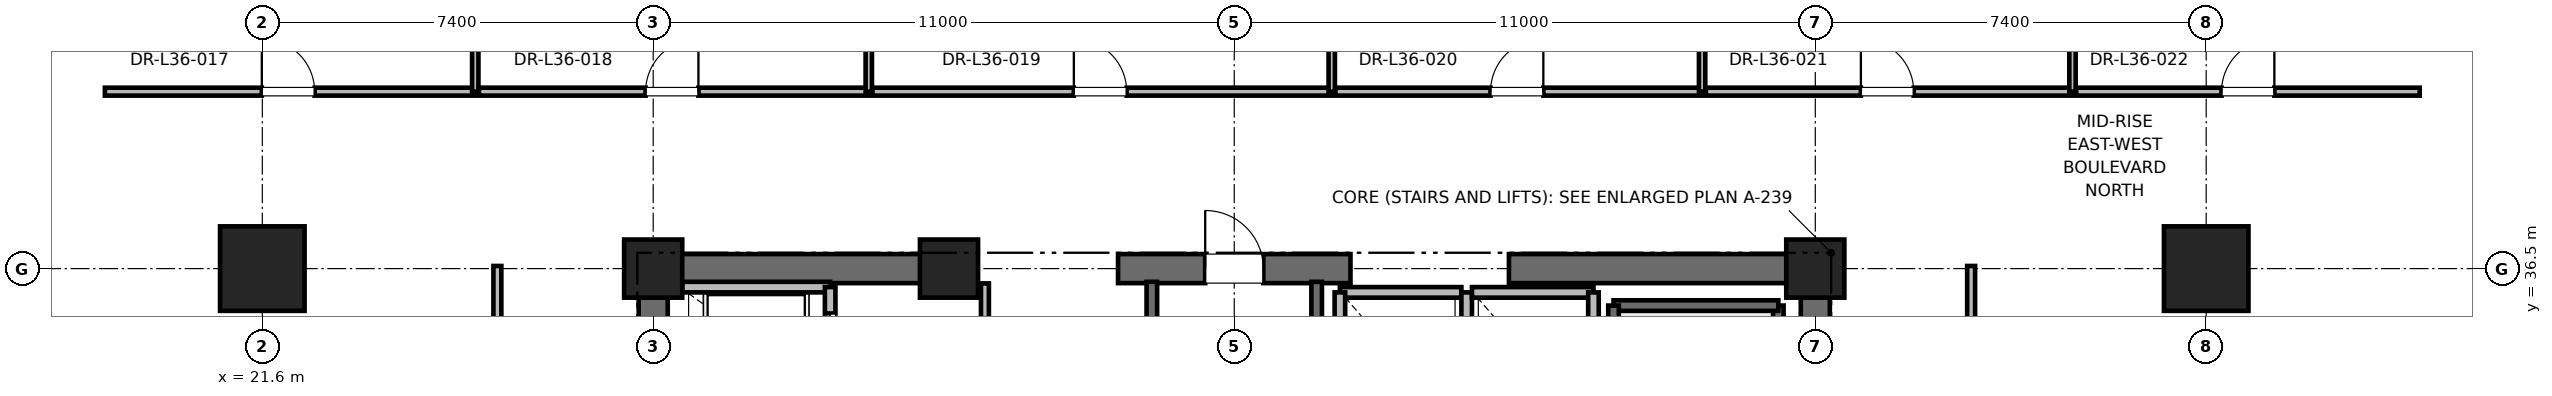
"""IFC4 building model, lengths in metres.
Left out: names, types, materials, properties, quantities, classifications, styles, units other than length and angle.
Written with IfcOpenShell. Run it as: python <this file> out.ifc"""

import sys

from ifc_helpers import new_model, si_unit, direction, frame, frame_2d, origin, origin_2d, place, context, subcontext, project, spatial, rectangle, extrude, element, fill, save


model = new_model("IFC4")
c1 = context("Model", 3, precision=1e-05, world=origin(), true_north=direction((0.0, 1.0)))
c2 = subcontext(c1, "Body", "Model", "MODEL_VIEW")
j1 = project(units=[si_unit("LENGTHUNIT", "METRE"), si_unit("PLANEANGLEUNIT", "RADIAN")], contexts=[c1])
p1 = place(None, origin())
s1 = spatial("IfcSite", under=j1, at=p1, CompositionType="ELEMENT")
p2 = place(p1, origin())
s2 = spatial("IfcBuilding", under=s1, at=p2, CompositionType="ELEMENT")
p3 = place(p2, frame((0.0, 0.0, 156.4)))
s3 = spatial("IfcBuildingStorey", under=s2, at=p3, CompositionType="ELEMENT", Elevation=156.4)
for number, where, z_axis, x_axis in (
    (1, (21.6, 36.5, 0.0), (0.0, 0.0, 1.0), (1.0, 0.0, 0.0)),
    (2, (58.4, 36.5, 0.0), (0.0, 0.0, 1.0), (1.0, 0.0, 0.0)),
):
    element("IfcColumn", number, at=place(p3, frame(where, z_axis=z_axis, x_axis=x_axis)), inside=s3, PredefinedType="COLUMN", context=c2, shape_type="SweptSolid", body=[
        extrude(rectangle(XDim=1.6, YDim=1.6, at=origin_2d()), origin(), (0.0, 0.0, 1.0), 4.0),
    ])
for number, where, z_axis, x_axis in (
    (3, (29.0, 36.5, 0.0), (0.0, 0.0, 1.0), (1.0, 0.0, 0.0)),
    (4, (51.0, 36.5, 0.0), (0.0, 0.0, 1.0), (1.0, 0.0, 0.0)),
    (5, (34.6, 36.5, 0.0), (0.0, 0.0, 1.0), (1.0, 0.0, 0.0)),
):
    element("IfcColumn", number, at=place(p3, frame(where, z_axis=z_axis, x_axis=x_axis)), inside=s3, PredefinedType="PILASTER", context=c2, shape_type="SweptSolid", body=[
        extrude(rectangle(XDim=1.1, YDim=1.1, at=origin_2d()), origin(), (0.0, 0.0, 1.0), 4.0),
    ])
p4 = place(p3, frame((29.0, 36.5, 0.0), z_axis=(0.0, 0.0, 1.0), x_axis=(1.0, 0.0, 0.0)))
e6 = element("IfcWall", 6, at=p4, inside=s3, PredefinedType="SHEAR", context=c2, shape_type="SweptSolid", body=[
    extrude(rectangle(XDim=5.8, YDim=0.55, at=frame_2d((2.9, 0.0))), origin(), (0.0, 0.0, 1.0), 3.775),
])
p5 = place(p3, frame((37.8, 36.5, 0.0), z_axis=(0.0, 0.0, 1.0), x_axis=(1.0, 0.0, 0.0)))
e7 = element("IfcWall", 7, at=p5, inside=s3, PredefinedType="SHEAR", context=c2, shape_type="SweptSolid", body=[
    extrude(rectangle(XDim=4.4, YDim=0.55, at=frame_2d((2.2, 0.0))), origin(), (0.0, 0.0, 1.0), 3.775),
])
p6 = place(p5, frame((1.65, 0.0, 0.0)))
e8 = element("IfcOpeningElement", 8, at=p6, cuts=e7, PredefinedType="OPENING", context=c2, shape_type="SweptSolid", body=[
    extrude(rectangle(XDim=1.1, YDim=2.15, at=frame_2d((0.55, 1.075))), frame((0.0, 0.275, 0.0), z_axis=(0.0, -1.0, 0.0), x_axis=(1.0, 0.0, 0.0)), (0.0, 0.0, 1.0), 0.55),
])
for number, where, z_axis, x_axis in (
    (9, (45.2, 36.5, 0.0), (0.0, 0.0, 1.0), (1.0, 0.0, 0.0)),
    (10, (29.0, 30.7, 0.0), (0.0, 0.0, 1.0), (0.0, 1.0, 0.0)),
):
    element("IfcWall", number, at=place(p3, frame(where, z_axis=z_axis, x_axis=x_axis)), inside=s3, PredefinedType="SHEAR", context=c2, shape_type="SweptSolid", body=[
        extrude(rectangle(XDim=5.8, YDim=0.55, at=frame_2d((2.9, 0.0))), origin(), (0.0, 0.0, 1.0), 3.775),
    ])
p7 = place(p3, frame((51.0, 27.7, 0.0), z_axis=(0.0, 0.0, 1.0), x_axis=(0.0, 1.0, 0.0)))
e11 = element("IfcWall", 11, at=p7, inside=s3, PredefinedType="SHEAR", context=c2, shape_type="SweptSolid", body=[
    extrude(rectangle(XDim=8.8, YDim=0.55, at=frame_2d((4.4, 0.0))), origin(), (0.0, 0.0, 1.0), 3.775),
])
p8 = place(p3, frame((50.3, 27.65, 0.0), z_axis=(0.0, 0.0, 1.0), x_axis=(0.0, 1.0, 0.0)))
e12 = element("IfcWall", 12, at=p8, inside=s3, PredefinedType="SOLIDWALL", context=c2, shape_type="SweptSolid", body=[
    extrude(rectangle(XDim=8.15, YDim=0.2, at=frame_2d((4.075, 0.0))), origin(), (0.0, 0.0, 1.0), 3.775),
])
p9 = place(p3, frame((47.18, 35.8, 0.0), z_axis=(0.0, 0.0, 1.0), x_axis=(1.0, 0.0, 0.0)))
e13 = element("IfcWall", 13, at=p9, inside=s3, PredefinedType="SOLIDWALL", context=c2, shape_type="SweptSolid", body=[
    extrude(rectangle(XDim=3.12, YDim=0.2, at=frame_2d((1.56, 0.0))), origin(), (0.0, 0.0, 1.0), 3.775),
])
p10 = place(p3, frame((47.18, 27.62, 0.0), z_axis=(0.0, 0.0, 1.0), x_axis=(0.0, 1.0, 0.0)))
e14 = element("IfcWall", 14, at=p10, inside=s3, PredefinedType="SOLIDWALL", context=c2, shape_type="SweptSolid", body=[
    extrude(rectangle(XDim=8.18, YDim=0.2, at=frame_2d((4.09, 0.0))), origin(), (0.0, 0.0, 1.0), 3.775),
])
p11 = place(p3, frame((38.44, 27.38, 0.0), z_axis=(0.0, 0.0, 1.0), x_axis=(0.0, 1.0, 0.0)))
e15 = element("IfcWall", 15, at=p11, inside=s3, PredefinedType="SOLIDWALL", context=c2, shape_type="SweptSolid", body=[
    extrude(rectangle(XDim=8.87, YDim=0.2, at=frame_2d((4.435, 0.0))), origin(), (0.0, 0.0, 1.0), 3.775),
])
p12 = place(p3, frame((41.56, 27.68, 0.0), z_axis=(0.0, 0.0, 1.0), x_axis=(0.0, 1.0, 0.0)))
e16 = element("IfcWall", 16, at=p12, inside=s3, PredefinedType="SOLIDWALL", context=c2, shape_type="SweptSolid", body=[
    extrude(rectangle(XDim=8.57, YDim=0.2, at=frame_2d((4.285, 0.0))), origin(), (0.0, 0.0, 1.0), 3.775),
])
p13 = place(p3, frame((32.35, 36.15, 0.0), z_axis=(0.0, 0.0, 1.0), x_axis=(-1.0, 0.0, 0.0)))
e17 = element("IfcWall", 17, at=p13, inside=s3, PredefinedType="SOLIDWALL", context=c2, shape_type="SweptSolid", body=[
    extrude(rectangle(XDim=2.8, YDim=0.2, at=frame_2d((1.4, 0.0))), origin(), (0.0, 0.0, 1.0), 2.985),
])
p14 = place(p3, frame((32.35, 34.05, 0.0), z_axis=(0.0, 0.0, 1.0), x_axis=(0.0, 1.0, 0.0)))
e18 = element("IfcWall", 18, at=p14, inside=s3, PredefinedType="SOLIDWALL", context=c2, shape_type="SweptSolid", body=[
    extrude(rectangle(XDim=2.1, YDim=0.2, at=frame_2d((1.05, 0.0))), origin(), (0.0, 0.0, 1.0), 3.775),
])
p15 = place(p14, frame((0.5, 0.0, 0.0)))
e19 = element("IfcOpeningElement", 19, at=p15, cuts=e18, PredefinedType="OPENING", context=c2, shape_type="SweptSolid", body=[
    extrude(rectangle(XDim=1.1, YDim=2.2, at=frame_2d((0.55, 1.1))), frame((0.0, 0.1, 0.0), z_axis=(0.0, -1.0, 0.0), x_axis=(1.0, 0.0, 0.0)), (0.0, 0.0, 1.0), 0.2),
])
p16 = place(p3, frame((44.3, 36.05, 0.0), z_axis=(0.0, 0.0, 1.0), x_axis=(-1.0, 0.0, 0.0)))
e20 = element("IfcWall", 20, at=p16, inside=s3, PredefinedType="SOLIDWALL", context=c2, shape_type="SweptSolid", body=[
    extrude(rectangle(XDim=2.3, YDim=0.2, at=frame_2d((1.15, 0.0))), origin(), (0.0, 0.0, 1.0), 2.755),
])
for number, where, z_axis, x_axis in (
    (21, (42.0, 36.05, 0.0), (0.0, 0.0, 1.0), (0.0, -1.0, 0.0)),
    (22, (44.4, 33.45, 0.0), (0.0, 0.0, 1.0), (0.0, 1.0, 0.0)),
):
    element("IfcWall", number, at=place(p3, frame(where, z_axis=z_axis, x_axis=x_axis)), inside=s3, PredefinedType="SOLIDWALL", context=c2, shape_type="SweptSolid", body=[
        extrude(rectangle(XDim=2.6, YDim=0.2, at=frame_2d((1.3, 0.0))), origin(), (0.0, 0.0, 1.0), 2.755),
    ])
p17 = place(p3, frame((46.8, 36.05, 0.0), z_axis=(0.0, 0.0, 1.0), x_axis=(-1.0, 0.0, 0.0)))
e23 = element("IfcWall", 23, at=p17, inside=s3, PredefinedType="SOLIDWALL", context=c2, shape_type="SweptSolid", body=[
    extrude(rectangle(XDim=2.3, YDim=0.2, at=frame_2d((1.15, 0.0))), origin(), (0.0, 0.0, 1.0), 2.755),
])
p18 = place(p3, frame((46.8, 33.45, 0.0), z_axis=(0.0, 0.0, 1.0), x_axis=(0.0, 1.0, 0.0)))
e24 = element("IfcWall", 24, at=p18, inside=s3, PredefinedType="SOLIDWALL", context=c2, shape_type="SweptSolid", body=[
    extrude(rectangle(XDim=2.6, YDim=0.2, at=frame_2d((1.3, 0.0))), origin(), (0.0, 0.0, 1.0), 3.775),
])
p19 = place(p3, frame((35.28, 33.95, 0.0), z_axis=(0.0, 0.0, 1.0), x_axis=(0.0, 1.0, 0.0)))
e25 = element("IfcWall", 25, at=p19, inside=s3, PredefinedType="PARTITIONING", context=c2, shape_type="SweptSolid", body=[
    extrude(rectangle(XDim=2.27, YDim=0.15, at=frame_2d((1.135, 0.0))), origin(), (0.0, 0.0, 1.0), 2.755),
])
p20 = place(p19, frame((0.66, 0.0, 0.0)))
e26 = element("IfcOpeningElement", 26, at=p20, cuts=e25, PredefinedType="OPENING", context=c2, shape_type="SweptSolid", body=[
    extrude(rectangle(XDim=0.95, YDim=2.15, at=frame_2d((0.475, 1.075))), frame((0.0, 0.075, 0.0), z_axis=(0.0, -1.0, 0.0), x_axis=(1.0, 0.0, 0.0)), (0.0, 0.0, 1.0), 0.15),
])
p21 = place(p3, frame((18.62, 39.85, 0.0), z_axis=(0.0, 0.0, 1.0), x_axis=(1.0, 0.0, 0.0)))
e27 = element("IfcWall", 27, at=p21, inside=s3, PredefinedType="PARTITIONING", context=c2, shape_type="SweptSolid", body=[
    extrude(rectangle(XDim=7.012, YDim=0.15, at=frame_2d((3.506, 0.0))), origin(), (0.0, 0.0, 1.0), 2.85),
])
p22 = place(p21, frame((2.971, 0.0, 0.0)))
e28 = element("IfcOpeningElement", 28, at=p22, cuts=e27, PredefinedType="OPENING", context=c2, shape_type="SweptSolid", body=[
    extrude(rectangle(XDim=1.0, YDim=2.15, at=frame_2d((0.5, 1.075))), frame((0.0, 0.075, 0.0), z_axis=(0.0, -1.0, 0.0), x_axis=(1.0, 0.0, 0.0)), (0.0, 0.0, 1.0), 0.15),
])
p23 = place(p3, frame((25.631, 39.85, 0.0), z_axis=(0.0, 0.0, 1.0), x_axis=(0.0, 1.0, 0.0)))
e29 = element("IfcWall", 29, at=p23, inside=s3, PredefinedType="PARTITIONING", context=c2, shape_type="SweptSolid", body=[
    extrude(rectangle(XDim=9.696, YDim=0.12, at=frame_2d((4.848, 0.0))), origin(), (0.0, 0.0, 1.0), 2.85),
])
p24 = place(p3, frame((25.701, 39.85, 0.0), z_axis=(0.0, 0.0, 1.0), x_axis=(1.0, 0.0, 0.0)))
e30 = element("IfcWall", 30, at=p24, inside=s3, PredefinedType="PARTITIONING", context=c2, shape_type="SweptSolid", body=[
    extrude(rectangle(XDim=7.38, YDim=0.15, at=frame_2d((3.69, 0.0))), origin(), (0.0, 0.0, 1.0), 2.85),
])
p25 = place(p24, frame((3.155, 0.0, 0.0)))
e31 = element("IfcOpeningElement", 31, at=p25, cuts=e30, PredefinedType="OPENING", context=c2, shape_type="SweptSolid", body=[
    extrude(rectangle(XDim=1.0, YDim=2.15, at=frame_2d((0.5, 1.075))), frame((0.0, 0.075, 0.0), z_axis=(0.0, -1.0, 0.0), x_axis=(1.0, 0.0, 0.0)), (0.0, 0.0, 1.0), 0.15),
])
p26 = place(p3, frame((33.081, 39.85, 0.0), z_axis=(0.0, 0.0, 1.0), x_axis=(0.0, 1.0, 0.0)))
e32 = element("IfcWall", 32, at=p26, inside=s3, PredefinedType="PARTITIONING", context=c2, shape_type="SweptSolid", body=[
    extrude(rectangle(XDim=9.696, YDim=0.12, at=frame_2d((4.848, 0.0))), origin(), (0.0, 0.0, 1.0), 2.405),
])
p27 = place(p3, frame((33.151, 39.85, 0.0), z_axis=(0.0, 0.0, 1.0), x_axis=(1.0, 0.0, 0.0)))
e33 = element("IfcWall", 33, at=p27, inside=s3, PredefinedType="PARTITIONING", context=c2, shape_type="SweptSolid", body=[
    extrude(rectangle(XDim=8.694, YDim=0.15, at=frame_2d((4.347, 0.0))), origin(), (0.0, 0.0, 1.0), 2.85),
])
p28 = place(p27, frame((3.812, 0.0, 0.0)))
e34 = element("IfcOpeningElement", 34, at=p28, cuts=e33, PredefinedType="OPENING", context=c2, shape_type="SweptSolid", body=[
    extrude(rectangle(XDim=1.0, YDim=2.15, at=frame_2d((0.5, 1.075))), frame((0.0, 0.075, 0.0), z_axis=(0.0, -1.0, 0.0), x_axis=(1.0, 0.0, 0.0)), (0.0, 0.0, 1.0), 0.15),
])
p29 = place(p3, frame((41.845, 39.85, 0.0), z_axis=(0.0, 0.0, 1.0), x_axis=(0.0, 1.0, 0.0)))
e35 = element("IfcWall", 35, at=p29, inside=s3, PredefinedType="PARTITIONING", context=c2, shape_type="SweptSolid", body=[
    extrude(rectangle(XDim=9.696, YDim=0.12, at=frame_2d((4.848, 0.0))), origin(), (0.0, 0.0, 1.0), 2.405),
])
p30 = place(p3, frame((41.916, 39.85, 0.0), z_axis=(0.0, 0.0, 1.0), x_axis=(1.0, 0.0, 0.0)))
e36 = element("IfcWall", 36, at=p30, inside=s3, PredefinedType="PARTITIONING", context=c2, shape_type="SweptSolid", body=[
    extrude(rectangle(XDim=6.942, YDim=0.15, at=frame_2d((3.471, 0.0))), origin(), (0.0, 0.0, 1.0), 2.85),
])
p31 = place(p30, frame((2.936, 0.0, 0.0)))
e37 = element("IfcOpeningElement", 37, at=p31, cuts=e36, PredefinedType="OPENING", context=c2, shape_type="SweptSolid", body=[
    extrude(rectangle(XDim=1.0, YDim=2.15, at=frame_2d((0.5, 1.075))), frame((0.0, 0.075, 0.0), z_axis=(0.0, -1.0, 0.0), x_axis=(1.0, 0.0, 0.0)), (0.0, 0.0, 1.0), 0.15),
])
p32 = place(p3, frame((48.857, 39.85, 0.0), z_axis=(0.0, 0.0, 1.0), x_axis=(0.0, 1.0, 0.0)))
e38 = element("IfcWall", 38, at=p32, inside=s3, PredefinedType="PARTITIONING", context=c2, shape_type="SweptSolid", body=[
    extrude(rectangle(XDim=9.696, YDim=0.12, at=frame_2d((4.848, 0.0))), origin(), (0.0, 0.0, 1.0), 2.405),
])
p33 = place(p3, frame((48.927, 39.85, 0.0), z_axis=(0.0, 0.0, 1.0), x_axis=(1.0, 0.0, 0.0)))
e39 = element("IfcWall", 39, at=p33, inside=s3, PredefinedType="PARTITIONING", context=c2, shape_type="SweptSolid", body=[
    extrude(rectangle(XDim=6.942, YDim=0.15, at=frame_2d((3.471, 0.0))), origin(), (0.0, 0.0, 1.0), 2.85),
])
p34 = place(p33, frame((2.936, 0.0, 0.0)))
e40 = element("IfcOpeningElement", 40, at=p34, cuts=e39, PredefinedType="OPENING", context=c2, shape_type="SweptSolid", body=[
    extrude(rectangle(XDim=1.0, YDim=2.15, at=frame_2d((0.5, 1.075))), frame((0.0, 0.075, 0.0), z_axis=(0.0, -1.0, 0.0), x_axis=(1.0, 0.0, 0.0)), (0.0, 0.0, 1.0), 0.15),
])
p35 = place(p3, frame((55.869, 39.85, 0.0), z_axis=(0.0, 0.0, 1.0), x_axis=(0.0, 1.0, 0.0)))
e41 = element("IfcWall", 41, at=p35, inside=s3, PredefinedType="PARTITIONING", context=c2, shape_type="SweptSolid", body=[
    extrude(rectangle(XDim=9.696, YDim=0.12, at=frame_2d((4.848, 0.0))), origin(), (0.0, 0.0, 1.0), 2.85),
])
p36 = place(p3, frame((55.939, 39.85, 0.0), z_axis=(0.0, 0.0, 1.0), x_axis=(1.0, 0.0, 0.0)))
e42 = element("IfcWall", 42, at=p36, inside=s3, PredefinedType="PARTITIONING", context=c2, shape_type="SweptSolid", body=[
    extrude(rectangle(XDim=6.503, YDim=0.15, at=frame_2d((3.251, 0.0))), origin(), (0.0, 0.0, 1.0), 2.85),
])
p37 = place(p36, frame((2.752, 0.0, 0.0)))
e43 = element("IfcOpeningElement", 43, at=p37, cuts=e42, PredefinedType="OPENING", context=c2, shape_type="SweptSolid", body=[
    extrude(rectangle(XDim=1.0, YDim=2.15, at=frame_2d((0.5, 1.075))), frame((0.0, 0.075, 0.0), z_axis=(0.0, -1.0, 0.0), x_axis=(1.0, 0.0, 0.0)), (0.0, 0.0, 1.0), 0.15),
])
p38 = place(p3, frame((26.05, 18.45, 0.0), z_axis=(0.0, 0.0, 1.0), x_axis=(0.0, 1.0, 0.0)))
e44 = element("IfcWall", 44, at=p38, inside=s3, PredefinedType="PARTITIONING", context=c2, shape_type="SweptSolid", body=[
    extrude(rectangle(XDim=18.1, YDim=0.15, at=frame_2d((9.05, 0.0))), origin(), (0.0, 0.0, 1.0), 2.85),
])
p39 = place(p38, frame((8.55, 0.0, 0.0)))
e45 = element("IfcOpeningElement", 45, at=p39, cuts=e44, PredefinedType="OPENING", context=c2, shape_type="SweptSolid", body=[
    extrude(rectangle(XDim=1.0, YDim=2.15, at=frame_2d((0.5, 1.075))), frame((0.0, 0.075, 0.0), z_axis=(0.0, -1.0, 0.0), x_axis=(1.0, 0.0, 0.0)), (0.0, 0.0, 1.0), 0.15),
])
p40 = place(p3, frame((53.95, 18.45, 0.0), z_axis=(0.0, 0.0, 1.0), x_axis=(0.0, 1.0, 0.0)))
e46 = element("IfcWall", 46, at=p40, inside=s3, PredefinedType="PARTITIONING", context=c2, shape_type="SweptSolid", body=[
    extrude(rectangle(XDim=18.1, YDim=0.15, at=frame_2d((9.05, 0.0))), origin(), (0.0, 0.0, 1.0), 2.85),
])
p41 = place(p40, frame((8.55, 0.0, 0.0)))
e47 = element("IfcOpeningElement", 47, at=p41, cuts=e46, PredefinedType="OPENING", context=c2, shape_type="SweptSolid", body=[
    extrude(rectangle(XDim=1.0, YDim=2.15, at=frame_2d((0.5, 1.075))), frame((0.0, 0.075, 0.0), z_axis=(0.0, -1.0, 0.0), x_axis=(1.0, 0.0, 0.0)), (0.0, 0.0, 1.0), 0.15),
])
p42 = place(p6, origin())
e48 = element("IfcDoor", 48, at=p42, inside=s3, OperationType="SINGLE_SWING_LEFT", PredefinedType="DOOR", context=c2, shape_type="SweptSolid", body=[
    extrude(rectangle(XDim=1.1, YDim=2.15, at=frame_2d((0.55, 1.075))), frame((0.0, 0.025, 0.0), z_axis=(0.0, -1.0, 0.0), x_axis=(1.0, 0.0, 0.0)), (0.0, 0.0, 1.0), 0.05),
])
fill(e8, e48)
p43 = place(p15, origin())
e49 = element("IfcDoor", 49, at=p43, inside=s3, OperationType="SLIDING_TO_RIGHT", PredefinedType="DOOR", context=c2, shape_type="SweptSolid", body=[
    extrude(rectangle(XDim=1.1, YDim=2.2, at=frame_2d((0.55, 1.1))), frame((0.0, 0.025, 0.0), z_axis=(0.0, -1.0, 0.0), x_axis=(1.0, 0.0, 0.0)), (0.0, 0.0, 1.0), 0.05),
])
fill(e19, e49)
p44 = place(p22, origin())
e50 = element("IfcDoor", 50, at=p44, inside=s3, OperationType="SINGLE_SWING_LEFT", PredefinedType="DOOR", context=c2, shape_type="SweptSolid", body=[
    extrude(rectangle(XDim=1.0, YDim=2.15, at=frame_2d((0.5, 1.075))), frame((0.0, 0.025, 0.0), z_axis=(0.0, -1.0, 0.0), x_axis=(1.0, 0.0, 0.0)), (0.0, 0.0, 1.0), 0.05),
])
fill(e28, e50)
p45 = place(p25, origin())
e51 = element("IfcDoor", 51, at=p45, inside=s3, OperationType="SINGLE_SWING_RIGHT", PredefinedType="DOOR", context=c2, shape_type="SweptSolid", body=[
    extrude(rectangle(XDim=1.0, YDim=2.15, at=frame_2d((0.5, 1.075))), frame((0.0, 0.025, 0.0), z_axis=(0.0, -1.0, 0.0), x_axis=(1.0, 0.0, 0.0)), (0.0, 0.0, 1.0), 0.05),
])
fill(e31, e51)
p46 = place(p28, origin())
e52 = element("IfcDoor", 52, at=p46, inside=s3, OperationType="SINGLE_SWING_LEFT", PredefinedType="DOOR", context=c2, shape_type="SweptSolid", body=[
    extrude(rectangle(XDim=1.0, YDim=2.15, at=frame_2d((0.5, 1.075))), frame((0.0, 0.025, 0.0), z_axis=(0.0, -1.0, 0.0), x_axis=(1.0, 0.0, 0.0)), (0.0, 0.0, 1.0), 0.05),
])
fill(e34, e52)
p47 = place(p31, origin())
e53 = element("IfcDoor", 53, at=p47, inside=s3, OperationType="SINGLE_SWING_RIGHT", PredefinedType="DOOR", context=c2, shape_type="SweptSolid", body=[
    extrude(rectangle(XDim=1.0, YDim=2.15, at=frame_2d((0.5, 1.075))), frame((0.0, 0.025, 0.0), z_axis=(0.0, -1.0, 0.0), x_axis=(1.0, 0.0, 0.0)), (0.0, 0.0, 1.0), 0.05),
])
fill(e37, e53)
p48 = place(p34, origin())
e54 = element("IfcDoor", 54, at=p48, inside=s3, OperationType="SINGLE_SWING_LEFT", PredefinedType="DOOR", context=c2, shape_type="SweptSolid", body=[
    extrude(rectangle(XDim=1.0, YDim=2.15, at=frame_2d((0.5, 1.075))), frame((0.0, 0.025, 0.0), z_axis=(0.0, -1.0, 0.0), x_axis=(1.0, 0.0, 0.0)), (0.0, 0.0, 1.0), 0.05),
])
fill(e40, e54)
p49 = place(p37, origin())
e55 = element("IfcDoor", 55, at=p49, inside=s3, OperationType="SINGLE_SWING_RIGHT", PredefinedType="DOOR", context=c2, shape_type="SweptSolid", body=[
    extrude(rectangle(XDim=1.0, YDim=2.15, at=frame_2d((0.5, 1.075))), frame((0.0, 0.025, 0.0), z_axis=(0.0, -1.0, 0.0), x_axis=(1.0, 0.0, 0.0)), (0.0, 0.0, 1.0), 0.05),
])
fill(e43, e55)
save(model, sys.argv[1])
